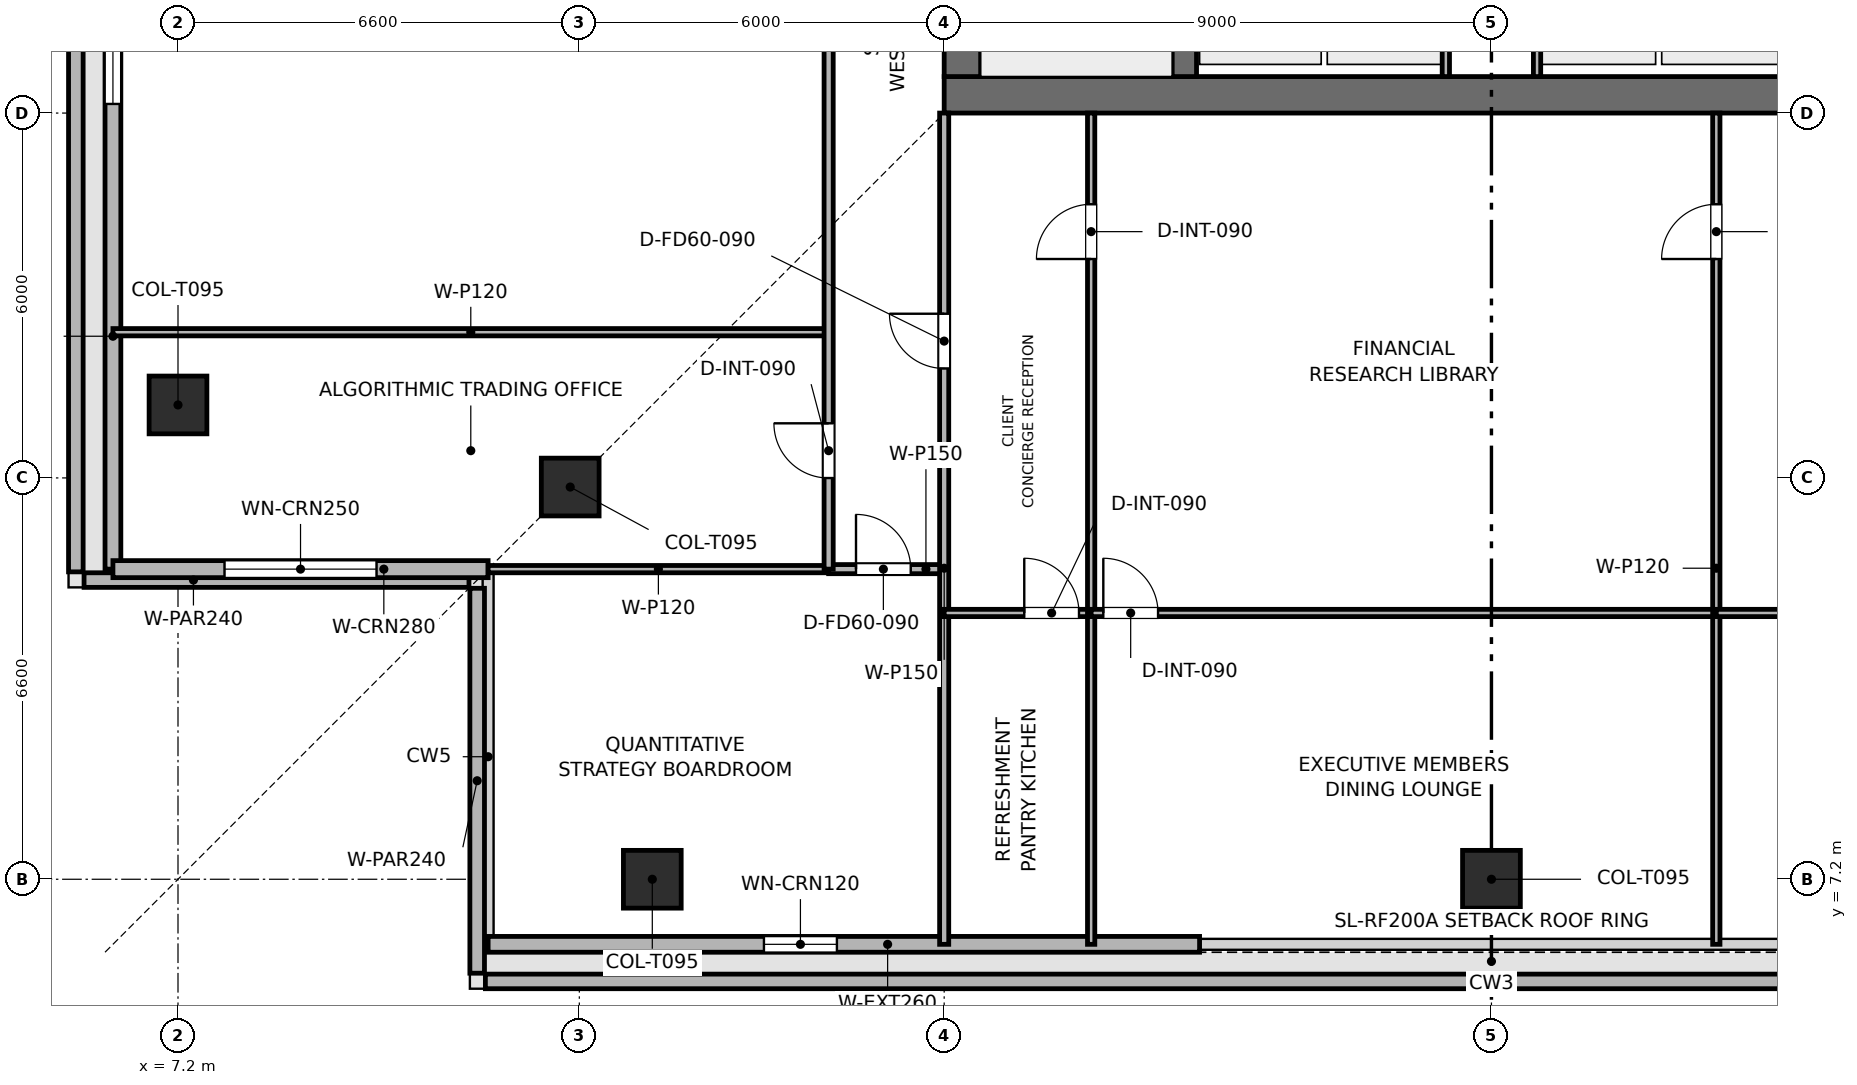
"""IFC4 building model, lengths in metres.
Left out: names, types, materials, properties, quantities, classifications, styles, units other than length and angle.
Written with IfcOpenShell. Run it as: python <this file> out.ifc"""

import sys

from ifc_helpers import new_model, si_unit, direction, frame, frame_2d, origin, origin_2d, place, context, subcontext, project, spatial, rectangle, extrude, element, fill, save


model = new_model("IFC4")
c1 = context("Model", 3, precision=1e-05, world=origin(), true_north=direction((0.0, 1.0)))
c2 = subcontext(c1, "Body", "Model", "MODEL_VIEW")
j1 = project(units=[si_unit("LENGTHUNIT", "METRE"), si_unit("PLANEANGLEUNIT", "RADIAN")], contexts=[c1])
p1 = place(None, origin())
s1 = spatial("IfcSite", under=j1, at=p1, CompositionType="ELEMENT")
p2 = place(p1, origin())
s2 = spatial("IfcBuilding", under=s1, at=p2, CompositionType="ELEMENT")
p3 = place(p2, frame((0.0, 0.0, 295.5)))
s3 = spatial("IfcBuildingStorey", under=s2, at=p3, CompositionType="ELEMENT", Elevation=295.5)
p4 = place(p3, frame((19.8, 20.1, 0.0), z_axis=(0.0, 0.0, 1.0), x_axis=(1.0, 0.0, 0.0)))
e1 = element("IfcWall", 1, at=p4, inside=s3, PredefinedType="SHEAR", context=c2, shape_type="SweptSolid", body=[
    extrude(rectangle(XDim=18.0, YDim=0.6, at=frame_2d((9.0, 0.0))), origin(), (0.0, 0.0, 1.0), 3.75),
])
p5 = place(p3, frame((20.1, 20.4, 0.0), z_axis=(0.0, 0.0, 1.0), x_axis=(0.0, 1.0, 0.0)))
e2 = element("IfcWall", 2, at=p5, inside=s3, PredefinedType="SHEAR", context=c2, shape_type="SweptSolid", body=[
    extrude(rectangle(XDim=16.8, YDim=0.6, at=frame_2d((8.4, 0.0))), origin(), (0.0, 0.0, 1.0), 3.75),
])
p6 = place(p5, frame((10.4, 0.0, 0.0)))
e3 = element("IfcOpeningElement", 3, at=p6, cuts=e2, PredefinedType="OPENING", context=c2, shape_type="SweptSolid", body=[
    extrude(rectangle(XDim=1.1, YDim=2.15, at=frame_2d((0.55, 1.075))), frame((0.0, 0.31, 0.0), z_axis=(0.0, -1.0, 0.0), x_axis=(1.0, 0.0, 0.0)), (0.0, 0.0, 1.0), 0.62),
])
p7 = place(p3, frame((23.75, 20.4, 0.0), z_axis=(0.0, 0.0, 1.0), x_axis=(0.0, 1.0, 0.0)))
e4 = element("IfcWall", 4, at=p7, inside=s3, PredefinedType="SHEAR", context=c2, shape_type="SweptSolid", body=[
    extrude(rectangle(XDim=16.8, YDim=0.4, at=frame_2d((8.4, 0.0))), origin(), (0.0, 0.0, 1.0), 3.75),
])
for number, where, z_axis, x_axis in (
    (5, (15.0, 7.2, 0.003), (0.0, 0.0, 1.0), (1.0, 0.0, 0.0)),
    (6, (28.8, 7.2, 0.003), (0.0, 0.0, 1.0), (1.0, 0.0, 0.0)),
    (7, (7.2, 15.0, 0.003), (0.0, 0.0, 1.0), (1.0, 0.0, 0.0)),
    (8, (13.65, 13.65, 0.003), (0.0, 0.0, 1.0), (1.0, 0.0, 0.0)),
):
    element("IfcColumn", number, at=place(p3, frame(where, z_axis=z_axis, x_axis=x_axis)), inside=s3, PredefinedType="COLUMN", context=c2, shape_type="SweptSolid", body=[
        extrude(rectangle(XDim=0.95, YDim=0.95, at=origin_2d()), origin(), (0.0, 0.0, 1.0), 3.504),
    ])
for number, where, z_axis, x_axis in (
    (9, (12.255, 5.52, 0.0), (0.0, 0.0, 1.0), (1.0, 0.0, 0.0)),
    (10, (5.52, 45.345, 0.0), (0.0, 0.0, 1.0), (0.0, -1.0, 0.0)),
):
    element("IfcWall", number, at=place(p3, frame(where, z_axis=z_axis, x_axis=x_axis)), inside=s3, PredefinedType="PARAPET", context=c2, shape_type="SweptSolid", body=[
        extrude(rectangle(XDim=33.09, YDim=0.24, at=frame_2d((16.545, 0.0))), origin(), (0.0, 0.0, 1.0), 1.2),
    ])
for number, where, z_axis, x_axis in (
    (11, (5.655, 12.12, 0.0), (0.0, 0.0, 1.0), (1.0, 0.0, 0.0)),
    (12, (12.12, 11.985, 0.0), (0.0, 0.0, 1.0), (0.0, -1.0, 0.0)),
):
    element("IfcWall", number, at=place(p3, frame(where, z_axis=z_axis, x_axis=x_axis)), inside=s3, PredefinedType="PARAPET", context=c2, shape_type="SweptSolid", body=[
        extrude(rectangle(XDim=6.33, YDim=0.24, at=frame_2d((3.165, 0.0))), origin(), (0.0, 0.0, 1.0), 1.2),
    ])
p8 = place(p3, frame((24.0, 6.13, 0.0), z_axis=(0.0, 0.0, 1.0), x_axis=(-1.0, 0.0, 0.0)))
e13 = element("IfcWall", 13, at=p8, inside=s3, PredefinedType="SOLIDWALL", context=c2, shape_type="SweptSolid", body=[
    extrude(rectangle(XDim=11.7, YDim=0.26, at=frame_2d((5.85, 0.0))), origin(), (0.0, 0.0, 1.0), 3.51),
])
p9 = place(p8, frame((5.964, 0.0, 0.9)))
e14 = element("IfcOpeningElement", 14, at=p9, cuts=e13, PredefinedType="OPENING", context=c2, shape_type="SweptSolid", body=[
    extrude(rectangle(XDim=1.2, YDim=2.1, at=frame_2d((0.6, 1.05))), frame((0.0, 0.14, 0.0), z_axis=(0.0, -1.0, 0.0), x_axis=(1.0, 0.0, 0.0)), (0.0, 0.0, 1.0), 0.28),
])
p10 = place(p3, frame((6.13, 12.3, 0.0), z_axis=(0.0, 0.0, 1.0), x_axis=(0.0, 1.0, 0.0)))
e15 = element("IfcWall", 15, at=p10, inside=s3, PredefinedType="SOLIDWALL", context=c2, shape_type="SweptSolid", body=[
    extrude(rectangle(XDim=11.7, YDim=0.26, at=frame_2d((5.85, 0.0))), origin(), (0.0, 0.0, 1.0), 3.51),
])
p11 = place(p10, frame((7.65, 0.0, 0.9)))
e16 = element("IfcOpeningElement", 16, at=p11, cuts=e15, PredefinedType="OPENING", context=c2, shape_type="SweptSolid", body=[
    extrude(rectangle(XDim=3.8, YDim=1.9, at=frame_2d((1.9, 0.95))), frame((0.0, 0.14, 0.0), z_axis=(0.0, -1.0, 0.0), x_axis=(1.0, 0.0, 0.0)), (0.0, 0.0, 1.0), 0.28),
])
p12 = place(p3, frame((12.3, 12.3, 0.0), z_axis=(0.0, 0.0, 1.0), x_axis=(-1.0, 0.0, 0.0)))
e17 = element("IfcWall", 17, at=p12, inside=s3, PredefinedType="SOLIDWALL", context=c2, shape_type="SweptSolid", body=[
    extrude(rectangle(XDim=6.17, YDim=0.28, at=frame_2d((3.085, 0.0))), origin(), (0.0, 0.0, 1.0), 3.51),
])
p13 = place(p12, frame((1.835, 0.0, 0.9)))
e18 = element("IfcOpeningElement", 18, at=p13, cuts=e17, PredefinedType="OPENING", context=c2, shape_type="SweptSolid", body=[
    extrude(rectangle(XDim=2.5, YDim=1.9, at=frame_2d((1.25, 0.95))), frame((0.0, 0.15, 0.0), z_axis=(0.0, -1.0, 0.0), x_axis=(1.0, 0.0, 0.0)), (0.0, 0.0, 1.0), 0.3),
])
for number, where, z_axis, x_axis in (
    (19, (28.05, 20.4, 0.0), (0.0, 0.0, 1.0), (0.0, 1.0, 0.0)),
    (20, (29.55, 20.4, 0.0), (0.0, 0.0, 1.0), (0.0, 1.0, 0.0)),
):
    element("IfcWall", number, at=place(p3, frame(where, z_axis=z_axis, x_axis=x_axis)), inside=s3, PredefinedType="PARTITIONING", context=c2, shape_type="SweptSolid", body=[
        extrude(rectangle(XDim=8.15, YDim=0.12, at=frame_2d((4.075, 0.0))), origin(), (0.0, 0.0, 1.0), 3.51),
    ])
p14 = place(p3, frame((6.13, 16.196, 0.0), z_axis=(0.0, 0.0, 1.0), x_axis=(1.0, 0.0, 0.0)))
e21 = element("IfcWall", 21, at=p14, inside=s3, PredefinedType="PARTITIONING", context=c2, shape_type="SweptSolid", body=[
    extrude(rectangle(XDim=11.77, YDim=0.12, at=frame_2d((5.885, 0.0))), origin(), (0.0, 0.0, 1.0), 3.095),
])
p15 = place(p3, frame((12.3, 12.3, 0.0), z_axis=(0.0, 0.0, 1.0), x_axis=(1.0, 0.0, 0.0)))
e22 = element("IfcWall", 22, at=p15, inside=s3, PredefinedType="PARTITIONING", context=c2, shape_type="SweptSolid", body=[
    extrude(rectangle(XDim=5.6, YDim=0.12, at=frame_2d((2.8, 0.0))), origin(), (0.0, 0.0, 1.0), 3.195),
])
p16 = place(p3, frame((17.9, 12.3, 0.0), z_axis=(0.0, 0.0, 1.0), x_axis=(1.0, 0.0, 0.0)))
e23 = element("IfcWall", 23, at=p16, inside=s3, PredefinedType="PARTITIONING", context=c2, shape_type="SweptSolid", body=[
    extrude(rectangle(XDim=1.9, YDim=0.15, at=frame_2d((0.95, 0.0))), origin(), (0.0, 0.0, 1.0), 3.51),
])
p17 = place(p16, frame((0.45, 0.0, 0.0)))
e24 = element("IfcOpeningElement", 24, at=p17, cuts=e23, PredefinedType="OPENING", context=c2, shape_type="SweptSolid", body=[
    extrude(rectangle(XDim=0.9, YDim=2.1, at=frame_2d((0.45, 1.05))), frame((0.0, 0.085, 0.0), z_axis=(0.0, -1.0, 0.0), x_axis=(1.0, 0.0, 0.0)), (0.0, 0.0, 1.0), 0.17),
])
p18 = place(p3, frame((19.8, 6.13, 0.0), z_axis=(0.0, 0.0, 1.0), x_axis=(0.0, 1.0, 0.0)))
e25 = element("IfcWall", 25, at=p18, inside=s3, PredefinedType="PARTITIONING", context=c2, shape_type="SweptSolid", body=[
    extrude(rectangle(XDim=13.67, YDim=0.15, at=frame_2d((6.835, 0.0))), origin(), (0.0, 0.0, 1.0), 3.095),
])
p19 = place(p18, frame((9.47, 0.0, 0.0)))
e26 = element("IfcOpeningElement", 26, at=p19, cuts=e25, PredefinedType="OPENING", context=c2, shape_type="SweptSolid", body=[
    extrude(rectangle(XDim=0.9, YDim=2.1, at=frame_2d((0.45, 1.05))), frame((0.0, 0.085, 0.0), z_axis=(0.0, -1.0, 0.0), x_axis=(1.0, 0.0, 0.0)), (0.0, 0.0, 1.0), 0.17),
])
p20 = place(p3, frame((19.8, 11.579, 0.0), z_axis=(0.0, 0.0, 1.0), x_axis=(1.0, 0.0, 0.0)))
e27 = element("IfcWall", 27, at=p20, inside=s3, PredefinedType="PARTITIONING", context=c2, shape_type="SweptSolid", body=[
    extrude(rectangle(XDim=2.417, YDim=0.12, at=frame_2d((1.208, 0.0))), origin(), (0.0, 0.0, 1.0), 3.095),
])
p21 = place(p20, frame((1.317, 0.0, 0.0)))
e28 = element("IfcOpeningElement", 28, at=p21, cuts=e27, PredefinedType="OPENING", context=c2, shape_type="SweptSolid", body=[
    extrude(rectangle(XDim=0.9, YDim=2.1, at=frame_2d((0.45, 1.05))), frame((0.0, 0.07, 0.0), z_axis=(0.0, -1.0, 0.0), x_axis=(1.0, 0.0, 0.0)), (0.0, 0.0, 1.0), 0.14),
])
p22 = place(p3, frame((22.217, 6.13, 0.0), z_axis=(0.0, 0.0, 1.0), x_axis=(0.0, 1.0, 0.0)))
e29 = element("IfcWall", 29, at=p22, inside=s3, PredefinedType="PARTITIONING", context=c2, shape_type="SweptSolid", body=[
    extrude(rectangle(XDim=13.67, YDim=0.12, at=frame_2d((6.835, 0.0))), origin(), (0.0, 0.0, 1.0), 3.135),
])
p23 = place(p22, frame((11.27, 0.0, 0.0)))
e30 = element("IfcOpeningElement", 30, at=p23, cuts=e29, PredefinedType="OPENING", context=c2, shape_type="SweptSolid", body=[
    extrude(rectangle(XDim=0.9, YDim=2.1, at=frame_2d((0.45, 1.05))), frame((0.0, 0.07, 0.0), z_axis=(0.0, -1.0, 0.0), x_axis=(1.0, 0.0, 0.0)), (0.0, 0.0, 1.0), 0.14),
])
p24 = place(p3, frame((22.217, 11.579, 0.0), z_axis=(0.0, 0.0, 1.0), x_axis=(1.0, 0.0, 0.0)))
e31 = element("IfcWall", 31, at=p24, inside=s3, PredefinedType="PARTITIONING", context=c2, shape_type="SweptSolid", body=[
    extrude(rectangle(XDim=10.281, YDim=0.12, at=frame_2d((5.141, 0.0))), origin(), (0.0, 0.0, 1.0), 3.095),
])
p25 = place(p24, frame((0.2, 0.0, 0.0)))
e32 = element("IfcOpeningElement", 32, at=p25, cuts=e31, PredefinedType="OPENING", context=c2, shape_type="SweptSolid", body=[
    extrude(rectangle(XDim=0.9, YDim=2.1, at=frame_2d((0.45, 1.05))), frame((0.0, 0.07, 0.0), z_axis=(0.0, -1.0, 0.0), x_axis=(1.0, 0.0, 0.0)), (0.0, 0.0, 1.0), 0.14),
])
p26 = place(p3, frame((32.498, 6.13, 0.0), z_axis=(0.0, 0.0, 1.0), x_axis=(0.0, 1.0, 0.0)))
e33 = element("IfcWall", 33, at=p26, inside=s3, PredefinedType="PARTITIONING", context=c2, shape_type="SweptSolid", body=[
    extrude(rectangle(XDim=13.67, YDim=0.12, at=frame_2d((6.835, 0.0))), origin(), (0.0, 0.0, 1.0), 3.135),
])
p27 = place(p26, frame((11.27, 0.0, 0.0)))
e34 = element("IfcOpeningElement", 34, at=p27, cuts=e33, PredefinedType="OPENING", context=c2, shape_type="SweptSolid", body=[
    extrude(rectangle(XDim=0.9, YDim=2.1, at=frame_2d((0.45, 1.05))), frame((0.0, 0.07, 0.0), z_axis=(0.0, -1.0, 0.0), x_axis=(1.0, 0.0, 0.0)), (0.0, 0.0, 1.0), 0.14),
])
p28 = place(p3, frame((32.498, 11.579, 0.0), z_axis=(0.0, 0.0, 1.0), x_axis=(1.0, 0.0, 0.0)))
e35 = element("IfcWall", 35, at=p28, inside=s3, PredefinedType="PARTITIONING", context=c2, shape_type="SweptSolid", body=[
    extrude(rectangle(XDim=12.802, YDim=0.12, at=frame_2d((6.401, 0.0))), origin(), (0.0, 0.0, 1.0), 3.095),
])
p29 = place(p28, frame((2.596, 0.0, 0.0)))
e36 = element("IfcOpeningElement", 36, at=p29, cuts=e35, PredefinedType="OPENING", context=c2, shape_type="SweptSolid", body=[
    extrude(rectangle(XDim=0.9, YDim=2.1, at=frame_2d((0.45, 1.05))), frame((0.0, 0.07, 0.0), z_axis=(0.0, -1.0, 0.0), x_axis=(1.0, 0.0, 0.0)), (0.0, 0.0, 1.0), 0.14),
])
p30 = place(p3, frame((17.9, 12.3, 0.0), z_axis=(0.0, 0.0, 1.0), x_axis=(0.0, 1.0, 0.0)))
e37 = element("IfcWall", 37, at=p30, inside=s3, PredefinedType="PARTITIONING", context=c2, shape_type="SweptSolid", body=[
    extrude(rectangle(XDim=27.4, YDim=0.15, at=frame_2d((13.7, 0.0))), origin(), (0.0, 0.0, 1.0), 3.095),
])
p31 = place(p30, frame((1.498, 0.0, 0.0)))
e38 = element("IfcOpeningElement", 38, at=p31, cuts=e37, PredefinedType="OPENING", context=c2, shape_type="SweptSolid", body=[
    extrude(rectangle(XDim=0.9, YDim=2.1, at=frame_2d((0.45, 1.05))), frame((0.0, 0.085, 0.0), z_axis=(0.0, -1.0, 0.0), x_axis=(1.0, 0.0, 0.0)), (0.0, 0.0, 1.0), 0.17),
])
p32 = place(p30, frame((15.198, 0.0, 0.0)))
e39 = element("IfcOpeningElement", 39, at=p32, cuts=e37, PredefinedType="OPENING", context=c2, shape_type="SweptSolid", body=[
    extrude(rectangle(XDim=0.9, YDim=2.1, at=frame_2d((0.45, 1.05))), frame((0.0, 0.085, 0.0), z_axis=(0.0, -1.0, 0.0), x_axis=(1.0, 0.0, 0.0)), (0.0, 0.0, 1.0), 0.17),
])
p33 = place(p9, origin())
e40 = element("IfcWindow", 40, at=p33, inside=s3, PartitioningType="SINGLE_PANEL", PredefinedType="WINDOW", context=c2, shape_type="SweptSolid", body=[
    extrude(rectangle(XDim=1.2, YDim=2.1, at=frame_2d((0.6, 1.05))), frame((0.0, 0.03, 0.0), z_axis=(0.0, -1.0, 0.0), x_axis=(1.0, 0.0, 0.0)), (0.0, 0.0, 1.0), 0.06),
])
fill(e14, e40)
p34 = place(p11, origin())
e41 = element("IfcWindow", 41, at=p34, inside=s3, PartitioningType="SINGLE_PANEL", PredefinedType="WINDOW", context=c2, shape_type="SweptSolid", body=[
    extrude(rectangle(XDim=3.8, YDim=1.9, at=frame_2d((1.9, 0.95))), frame((0.0, 0.03, 0.0), z_axis=(0.0, -1.0, 0.0), x_axis=(1.0, 0.0, 0.0)), (0.0, 0.0, 1.0), 0.06),
])
fill(e16, e41)
p35 = place(p13, origin())
e42 = element("IfcWindow", 42, at=p35, inside=s3, PartitioningType="SINGLE_PANEL", PredefinedType="WINDOW", context=c2, shape_type="SweptSolid", body=[
    extrude(rectangle(XDim=2.5, YDim=1.9, at=frame_2d((1.25, 0.95))), frame((0.0, 0.03, 0.0), z_axis=(0.0, -1.0, 0.0), x_axis=(1.0, 0.0, 0.0)), (0.0, 0.0, 1.0), 0.06),
])
fill(e18, e42)
p36 = place(p17, origin())
e43 = element("IfcDoor", 43, at=p36, inside=s3, OperationType="SINGLE_SWING_LEFT", PredefinedType="DOOR", context=c2, shape_type="SweptSolid", body=[
    extrude(rectangle(XDim=0.9, YDim=2.1, at=frame_2d((0.45, 1.05))), frame((0.0, 0.025, 0.0), z_axis=(0.0, -1.0, 0.0), x_axis=(1.0, 0.0, 0.0)), (0.0, 0.0, 1.0), 0.05),
])
fill(e24, e43)
p37 = place(p19, origin())
e44 = element("IfcDoor", 44, at=p37, inside=s3, OperationType="SINGLE_SWING_RIGHT", PredefinedType="DOOR", context=c2, shape_type="SweptSolid", body=[
    extrude(rectangle(XDim=0.9, YDim=2.1, at=frame_2d((0.45, 1.05))), frame((0.0, 0.025, 0.0), z_axis=(0.0, -1.0, 0.0), x_axis=(1.0, 0.0, 0.0)), (0.0, 0.0, 1.0), 0.05),
])
fill(e26, e44)
p38 = place(p21, origin())
e45 = element("IfcDoor", 45, at=p38, inside=s3, OperationType="SINGLE_SWING_LEFT", PredefinedType="DOOR", context=c2, shape_type="SweptSolid", body=[
    extrude(rectangle(XDim=0.9, YDim=2.1, at=frame_2d((0.45, 1.05))), frame((0.0, 0.025, 0.0), z_axis=(0.0, -1.0, 0.0), x_axis=(1.0, 0.0, 0.0)), (0.0, 0.0, 1.0), 0.05),
])
fill(e28, e45)
p39 = place(p23, origin())
e46 = element("IfcDoor", 46, at=p39, inside=s3, OperationType="SINGLE_SWING_LEFT", PredefinedType="DOOR", context=c2, shape_type="SweptSolid", body=[
    extrude(rectangle(XDim=0.9, YDim=2.1, at=frame_2d((0.45, 1.05))), frame((0.0, 0.025, 0.0), z_axis=(0.0, -1.0, 0.0), x_axis=(1.0, 0.0, 0.0)), (0.0, 0.0, 1.0), 0.05),
])
fill(e30, e46)
p40 = place(p25, origin())
e47 = element("IfcDoor", 47, at=p40, inside=s3, OperationType="SINGLE_SWING_LEFT", PredefinedType="DOOR", context=c2, shape_type="SweptSolid", body=[
    extrude(rectangle(XDim=0.9, YDim=2.1, at=frame_2d((0.45, 1.05))), frame((0.0, 0.025, 0.0), z_axis=(0.0, -1.0, 0.0), x_axis=(1.0, 0.0, 0.0)), (0.0, 0.0, 1.0), 0.05),
])
fill(e32, e47)
p41 = place(p27, origin())
e48 = element("IfcDoor", 48, at=p41, inside=s3, OperationType="SINGLE_SWING_LEFT", PredefinedType="DOOR", context=c2, shape_type="SweptSolid", body=[
    extrude(rectangle(XDim=0.9, YDim=2.1, at=frame_2d((0.45, 1.05))), frame((0.0, 0.025, 0.0), z_axis=(0.0, -1.0, 0.0), x_axis=(1.0, 0.0, 0.0)), (0.0, 0.0, 1.0), 0.05),
])
fill(e34, e48)
p42 = place(p31, origin())
e49 = element("IfcDoor", 49, at=p42, inside=s3, OperationType="SINGLE_SWING_RIGHT", PredefinedType="DOOR", context=c2, shape_type="SweptSolid", body=[
    extrude(rectangle(XDim=0.9, YDim=2.1, at=frame_2d((0.45, 1.05))), frame((0.0, 0.025, 0.0), z_axis=(0.0, -1.0, 0.0), x_axis=(1.0, 0.0, 0.0)), (0.0, 0.0, 1.0), 0.05),
])
fill(e38, e49)
save(model, sys.argv[1])
